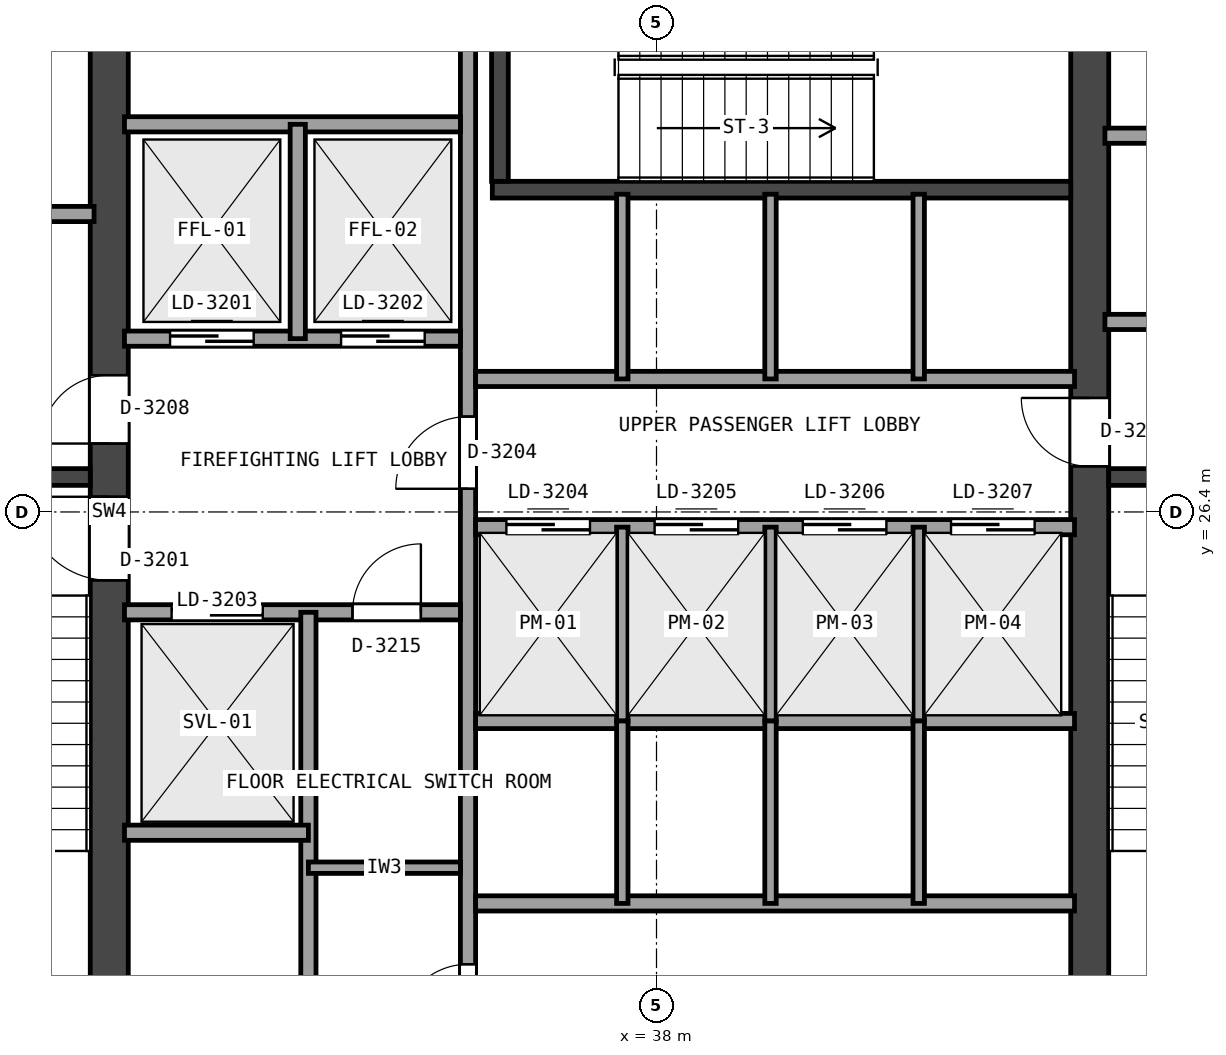
"""IFC4 building model, lengths in metres.
Left out: names, types, materials, properties, quantities, classifications, styles, units other than length and angle.
Written with IfcOpenShell. Run it as: python <this file> out.ifc"""

import sys

from ifc_helpers import new_model, si_unit, direction, frame, frame_2d, origin, place, context, subcontext, project, spatial, rectangle, extrude, element, fill, save


model = new_model("IFC4")
c1 = context("Model", 3, precision=1e-05, world=origin(), true_north=direction((0.0, 1.0)))
c2 = subcontext(c1, "Body", "Model", "MODEL_VIEW")
j1 = project(units=[si_unit("LENGTHUNIT", "METRE"), si_unit("PLANEANGLEUNIT", "RADIAN")], contexts=[c1])
p1 = place(None, origin())
s1 = spatial("IfcSite", under=j1, at=p1, CompositionType="ELEMENT")
p2 = place(p1, origin())
s2 = spatial("IfcBuilding", under=s1, at=p2, CompositionType="ELEMENT")
p3 = place(p2, frame((0.0, 0.0, 121.2)))
s3 = spatial("IfcBuildingStorey", under=s2, at=p3, CompositionType="ELEMENT", Elevation=121.2)
p4 = place(p3, frame((30.8, 18.9, 0.0), z_axis=(0.0, 0.0, 1.0), x_axis=(0.0, 1.0, 0.0)))
e1 = element("IfcWall", 1, at=p4, inside=s3, PredefinedType="SHEAR", context=c2, shape_type="SweptSolid", body=[
    extrude(rectangle(XDim=15.0, YDim=0.5, at=frame_2d((7.5, 0.0))), origin(), (0.0, 0.0, 1.0), 4.08),
])
p5 = place(p4, frame((6.6, 0.0, 0.0)))
e2 = element("IfcOpeningElement", 2, at=p5, cuts=e1, PredefinedType="OPENING", context=c2, shape_type="SweptSolid", body=[
    extrude(rectangle(XDim=1.1, YDim=2.15, at=frame_2d((0.55, 1.075))), frame((0.0, 0.26, 0.0), z_axis=(0.0, -1.0, 0.0), x_axis=(1.0, 0.0, 0.0)), (0.0, 0.0, 1.0), 0.52),
])
p6 = place(p4, frame((8.4, 0.0, 0.0)))
e3 = element("IfcOpeningElement", 3, at=p6, cuts=e1, PredefinedType="OPENING", context=c2, shape_type="SweptSolid", body=[
    extrude(rectangle(XDim=0.9, YDim=2.1, at=frame_2d((0.45, 1.05))), frame((0.0, 0.26, 0.0), z_axis=(0.0, -1.0, 0.0), x_axis=(1.0, 0.0, 0.0)), (0.0, 0.0, 1.0), 0.52),
])
p7 = place(p3, frame((43.7, 18.9, 0.0), z_axis=(0.0, 0.0, 1.0), x_axis=(0.0, 1.0, 0.0)))
e4 = element("IfcWall", 4, at=p7, inside=s3, PredefinedType="SHEAR", context=c2, shape_type="SweptSolid", body=[
    extrude(rectangle(XDim=15.0, YDim=0.5, at=frame_2d((7.5, 0.0))), origin(), (0.0, 0.0, 1.0), 4.08),
])
p8 = place(p7, frame((8.1, 0.0, 0.0)))
e5 = element("IfcOpeningElement", 5, at=p8, cuts=e4, PredefinedType="OPENING", context=c2, shape_type="SweptSolid", body=[
    extrude(rectangle(XDim=0.9, YDim=2.1, at=frame_2d((0.45, 1.05))), frame((0.0, 0.26, 0.0), z_axis=(0.0, -1.0, 0.0), x_axis=(1.0, 0.0, 0.0)), (0.0, 0.0, 1.0), 0.52),
])
p9 = place(p3, frame((27.1, 26.86, 0.0), z_axis=(0.0, 0.0, 1.0), x_axis=(1.0, 0.0, 0.0)))
e6 = element("IfcWall", 6, at=p9, inside=s3, PredefinedType="SHEAR", context=c2, shape_type="SweptSolid", body=[
    extrude(rectangle(XDim=3.45, YDim=0.22, at=frame_2d((1.725, 0.0))), origin(), (0.0, 0.0, 1.0), 4.08),
])
p10 = place(p3, frame((43.95, 26.86, 0.0), z_axis=(0.0, 0.0, 1.0), x_axis=(1.0, 0.0, 0.0)))
e7 = element("IfcWall", 7, at=p10, inside=s3, PredefinedType="SHEAR", context=c2, shape_type="SweptSolid", body=[
    extrude(rectangle(XDim=3.35, YDim=0.22, at=frame_2d((1.675, 0.0))), origin(), (0.0, 0.0, 1.0), 4.08),
])
p11 = place(p3, frame((35.84, 30.64, 0.0), z_axis=(0.0, 0.0, 1.0), x_axis=(1.0, 0.0, 0.0)))
e8 = element("IfcWall", 8, at=p11, inside=s3, PredefinedType="SHEAR", context=c2, shape_type="SweptSolid", body=[
    extrude(rectangle(XDim=7.61, YDim=0.22, at=frame_2d((3.805, 0.0))), origin(), (0.0, 0.0, 1.0), 4.08),
])
p12 = place(p3, frame((35.94, 30.75, 0.0), z_axis=(0.0, 0.0, 1.0), x_axis=(0.0, 1.0, 0.0)))
e9 = element("IfcWall", 9, at=p12, inside=s3, PredefinedType="SHEAR", context=c2, shape_type="SweptSolid", body=[
    extrude(rectangle(XDim=3.15, YDim=0.22, at=frame_2d((1.575, 0.0))), origin(), (0.0, 0.0, 1.0), 4.08),
])
p13 = place(p3, frame((27.15, 30.32, 0.0), z_axis=(0.0, 0.0, 1.0), x_axis=(1.0, 0.0, 0.0)))
e10 = element("IfcWall", 10, at=p13, inside=s3, PredefinedType="SOLIDWALL", context=c2, shape_type="SweptSolid", body=[
    extrude(rectangle(XDim=3.45, YDim=0.2, at=frame_2d((1.725, 0.0))), origin(), (0.0, 0.0, 1.0), 4.08),
])
p14 = place(p3, frame((43.9, 28.9, 0.0), z_axis=(0.0, 0.0, 1.0), x_axis=(1.0, 0.0, 0.0)))
e11 = element("IfcWall", 11, at=p14, inside=s3, PredefinedType="SOLIDWALL", context=c2, shape_type="SweptSolid", body=[
    extrude(rectangle(XDim=3.35, YDim=0.2, at=frame_2d((1.675, 0.0))), origin(), (0.0, 0.0, 1.0), 4.08),
])
p15 = place(p14, frame((1.15, 0.0, 0.0)))
e12 = element("IfcOpeningElement", 12, at=p15, cuts=e11, PredefinedType="OPENING", context=c2, shape_type="SweptSolid", body=[
    extrude(rectangle(XDim=0.9, YDim=2.1, at=frame_2d((0.45, 1.05))), frame((0.0, 0.11, 0.0), z_axis=(0.0, -1.0, 0.0), x_axis=(1.0, 0.0, 0.0)), (0.0, 0.0, 1.0), 0.22),
])
p16 = place(p3, frame((43.9, 31.35, 0.0), z_axis=(0.0, 0.0, 1.0), x_axis=(1.0, 0.0, 0.0)))
e13 = element("IfcWall", 13, at=p16, inside=s3, PredefinedType="SOLIDWALL", context=c2, shape_type="SweptSolid", body=[
    extrude(rectangle(XDim=3.35, YDim=0.2, at=frame_2d((1.675, 0.0))), origin(), (0.0, 0.0, 1.0), 4.08),
])
p17 = place(p3, frame((35.52, 18.95, 0.0), z_axis=(0.0, 0.0, 1.0), x_axis=(0.0, 1.0, 0.0)))
e14 = element("IfcWall", 14, at=p17, inside=s3, PredefinedType="SOLIDWALL", context=c2, shape_type="SweptSolid", body=[
    extrude(rectangle(XDim=14.9, YDim=0.2, at=frame_2d((7.45, 0.0))), origin(), (0.0, 0.0, 1.0), 3.601),
])
p18 = place(p17, frame((7.755, 0.0, 0.0)))
e15 = element("IfcOpeningElement", 15, at=p18, cuts=e14, PredefinedType="OPENING", context=c2, shape_type="SweptSolid", body=[
    extrude(rectangle(XDim=0.95, YDim=2.15, at=frame_2d((0.475, 1.075))), frame((0.0, 0.11, 0.0), z_axis=(0.0, -1.0, 0.0), x_axis=(1.0, 0.0, 0.0)), (0.0, 0.0, 1.0), 0.22),
])
p19 = place(p17, frame((0.6, 0.0, 0.0)))
e16 = element("IfcOpeningElement", 16, at=p19, cuts=e14, PredefinedType="OPENING", context=c2, shape_type="SweptSolid", body=[
    extrude(rectangle(XDim=0.9, YDim=2.1, at=frame_2d((0.45, 1.05))), frame((0.0, 0.11, 0.0), z_axis=(0.0, -1.0, 0.0), x_axis=(1.0, 0.0, 0.0)), (0.0, 0.0, 1.0), 0.22),
])
p20 = place(p3, frame((31.0, 28.68, 0.0), z_axis=(0.0, 0.0, 1.0), x_axis=(1.0, 0.0, 0.0)))
e17 = element("IfcWall", 17, at=p20, inside=s3, PredefinedType="SOLIDWALL", context=c2, shape_type="SweptSolid", body=[
    extrude(rectangle(XDim=4.42, YDim=0.2, at=frame_2d((2.21, 0.0))), origin(), (0.0, 0.0, 1.0), 4.08),
])
p21 = place(p20, frame((0.6, 0.0, 0.0)))
e18 = element("IfcOpeningElement", 18, at=p21, cuts=e17, PredefinedType="OPENING", context=c2, shape_type="SweptSolid", body=[
    extrude(rectangle(XDim=1.1, YDim=2.15, at=frame_2d((0.55, 1.075))), frame((0.0, 0.11, 0.0), z_axis=(0.0, -1.0, 0.0), x_axis=(1.0, 0.0, 0.0)), (0.0, 0.0, 1.0), 0.22),
])
p22 = place(p20, frame((2.85, 0.0, 0.0)))
e19 = element("IfcOpeningElement", 19, at=p22, cuts=e17, PredefinedType="OPENING", context=c2, shape_type="SweptSolid", body=[
    extrude(rectangle(XDim=1.1, YDim=2.15, at=frame_2d((0.55, 1.075))), frame((0.0, 0.11, 0.0), z_axis=(0.0, -1.0, 0.0), x_axis=(1.0, 0.0, 0.0)), (0.0, 0.0, 1.0), 0.22),
])
p23 = place(p3, frame((31.0, 31.5, 0.0), z_axis=(0.0, 0.0, 1.0), x_axis=(1.0, 0.0, 0.0)))
e20 = element("IfcWall", 20, at=p23, inside=s3, PredefinedType="SOLIDWALL", context=c2, shape_type="SweptSolid", body=[
    extrude(rectangle(XDim=4.42, YDim=0.2, at=frame_2d((2.21, 0.0))), origin(), (0.0, 0.0, 1.0), 4.08),
])
p24 = place(p3, frame((33.28, 28.68, 0.0), z_axis=(0.0, 0.0, 1.0), x_axis=(0.0, 1.0, 0.0)))
e21 = element("IfcWall", 21, at=p24, inside=s3, PredefinedType="SOLIDWALL", context=c2, shape_type="SweptSolid", body=[
    extrude(rectangle(XDim=2.82, YDim=0.2, at=frame_2d((1.41, 0.0))), origin(), (0.0, 0.0, 1.0), 4.08),
])
p25 = place(p3, frame((31.0, 25.08, 0.0), z_axis=(0.0, 0.0, 1.0), x_axis=(1.0, 0.0, 0.0)))
e22 = element("IfcWall", 22, at=p25, inside=s3, PredefinedType="SOLIDWALL", context=c2, shape_type="SweptSolid", body=[
    extrude(rectangle(XDim=4.42, YDim=0.2, at=frame_2d((2.21, 0.0))), origin(), (0.0, 0.0, 1.0), 4.08),
])
p26 = place(p25, frame((3.0, 0.0, 0.0)))
e23 = element("IfcOpeningElement", 23, at=p26, cuts=e22, PredefinedType="OPENING", context=c2, shape_type="SweptSolid", body=[
    extrude(rectangle(XDim=0.9, YDim=2.1, at=frame_2d((0.45, 1.05))), frame((0.0, 0.11, 0.0), z_axis=(0.0, -1.0, 0.0), x_axis=(1.0, 0.0, 0.0)), (0.0, 0.0, 1.0), 0.22),
])
p27 = place(p25, frame((0.62, 0.0, 0.0)))
e24 = element("IfcOpeningElement", 24, at=p27, cuts=e22, PredefinedType="OPENING", context=c2, shape_type="SweptSolid", body=[
    extrude(rectangle(XDim=1.2, YDim=2.15, at=frame_2d((0.6, 1.075))), frame((0.0, 0.11, 0.0), z_axis=(0.0, -1.0, 0.0), x_axis=(1.0, 0.0, 0.0)), (0.0, 0.0, 1.0), 0.22),
])
p28 = place(p3, frame((33.42, 18.95, 0.0), z_axis=(0.0, 0.0, 1.0), x_axis=(0.0, 1.0, 0.0)))
e25 = element("IfcWall", 25, at=p28, inside=s3, PredefinedType="SOLIDWALL", context=c2, shape_type="SweptSolid", body=[
    extrude(rectangle(XDim=6.13, YDim=0.2, at=frame_2d((3.065, 0.0))), origin(), (0.0, 0.0, 1.0), 3.601),
])
p29 = place(p3, frame((31.0, 22.18, 0.0), z_axis=(0.0, 0.0, 1.0), x_axis=(1.0, 0.0, 0.0)))
e26 = element("IfcWall", 26, at=p29, inside=s3, PredefinedType="SOLIDWALL", context=c2, shape_type="SweptSolid", body=[
    extrude(rectangle(XDim=2.42, YDim=0.2, at=frame_2d((1.21, 0.0))), origin(), (0.0, 0.0, 1.0), 4.08),
])
p30 = place(p3, frame((33.42, 21.72, 0.0), z_axis=(0.0, 0.0, 1.0), x_axis=(1.0, 0.0, 0.0)))
e27 = element("IfcWall", 27, at=p30, inside=s3, PredefinedType="PARTITIONING", context=c2, shape_type="SweptSolid", body=[
    extrude(rectangle(XDim=2.0, YDim=0.15, at=frame_2d((1.0, 0.0))), origin(), (0.0, 0.0, 1.0), 4.08),
])
p31 = place(p3, frame((35.62, 28.15, 0.0), z_axis=(0.0, 0.0, 1.0), x_axis=(1.0, 0.0, 0.0)))
e28 = element("IfcWall", 28, at=p31, inside=s3, PredefinedType="SOLIDWALL", context=c2, shape_type="SweptSolid", body=[
    extrude(rectangle(XDim=7.88, YDim=0.2, at=frame_2d((3.94, 0.0))), origin(), (0.0, 0.0, 1.0), 4.08),
])
p32 = place(p3, frame((35.62, 26.2, 0.0), z_axis=(0.0, 0.0, 1.0), x_axis=(1.0, 0.0, 0.0)))
e29 = element("IfcWall", 29, at=p32, inside=s3, PredefinedType="SOLIDWALL", context=c2, shape_type="SweptSolid", body=[
    extrude(rectangle(XDim=7.88, YDim=0.2, at=frame_2d((3.94, 0.0))), origin(), (0.0, 0.0, 1.0), 4.08),
])
p33 = place(p32, frame((0.405, 0.0, 0.0)))
e30 = element("IfcOpeningElement", 30, at=p33, cuts=e29, PredefinedType="OPENING", context=c2, shape_type="SweptSolid", body=[
    extrude(rectangle(XDim=1.1, YDim=2.15, at=frame_2d((0.55, 1.075))), frame((0.0, 0.11, 0.0), z_axis=(0.0, -1.0, 0.0), x_axis=(1.0, 0.0, 0.0)), (0.0, 0.0, 1.0), 0.22),
])
p34 = place(p32, frame((2.355, 0.0, 0.0)))
e31 = element("IfcOpeningElement", 31, at=p34, cuts=e29, PredefinedType="OPENING", context=c2, shape_type="SweptSolid", body=[
    extrude(rectangle(XDim=1.1, YDim=2.15, at=frame_2d((0.55, 1.075))), frame((0.0, 0.11, 0.0), z_axis=(0.0, -1.0, 0.0), x_axis=(1.0, 0.0, 0.0)), (0.0, 0.0, 1.0), 0.22),
])
p35 = place(p32, frame((4.305, 0.0, 0.0)))
e32 = element("IfcOpeningElement", 32, at=p35, cuts=e29, PredefinedType="OPENING", context=c2, shape_type="SweptSolid", body=[
    extrude(rectangle(XDim=1.1, YDim=2.15, at=frame_2d((0.55, 1.075))), frame((0.0, 0.11, 0.0), z_axis=(0.0, -1.0, 0.0), x_axis=(1.0, 0.0, 0.0)), (0.0, 0.0, 1.0), 0.22),
])
p36 = place(p32, frame((6.255, 0.0, 0.0)))
e33 = element("IfcOpeningElement", 33, at=p36, cuts=e29, PredefinedType="OPENING", context=c2, shape_type="SweptSolid", body=[
    extrude(rectangle(XDim=1.1, YDim=2.15, at=frame_2d((0.55, 1.075))), frame((0.0, 0.11, 0.0), z_axis=(0.0, -1.0, 0.0), x_axis=(1.0, 0.0, 0.0)), (0.0, 0.0, 1.0), 0.22),
])
p37 = place(p3, frame((35.62, 23.65, 0.0), z_axis=(0.0, 0.0, 1.0), x_axis=(1.0, 0.0, 0.0)))
e34 = element("IfcWall", 34, at=p37, inside=s3, PredefinedType="SOLIDWALL", context=c2, shape_type="SweptSolid", body=[
    extrude(rectangle(XDim=7.88, YDim=0.2, at=frame_2d((3.94, 0.0))), origin(), (0.0, 0.0, 1.0), 3.601),
])
p38 = place(p3, frame((35.62, 21.25, 0.0), z_axis=(0.0, 0.0, 1.0), x_axis=(1.0, 0.0, 0.0)))
e35 = element("IfcWall", 35, at=p38, inside=s3, PredefinedType="SOLIDWALL", context=c2, shape_type="SweptSolid", body=[
    extrude(rectangle(XDim=7.88, YDim=0.2, at=frame_2d((3.94, 0.0))), origin(), (0.0, 0.0, 1.0), 4.08),
])
for number, where, z_axis, x_axis in (
    (36, (37.55, 28.15, 0.0), (0.0, 0.0, 1.0), (0.0, 1.0, 0.0)),
    (37, (39.5, 28.15, 0.0), (0.0, 0.0, 1.0), (0.0, 1.0, 0.0)),
    (38, (41.45, 28.15, 0.0), (0.0, 0.0, 1.0), (0.0, 1.0, 0.0)),
):
    element("IfcWall", number, at=place(p3, frame(where, z_axis=z_axis, x_axis=x_axis)), inside=s3, PredefinedType="PARTITIONING", context=c2, shape_type="SweptSolid", body=[
        extrude(rectangle(XDim=2.43, YDim=0.15, at=frame_2d((1.215, 0.0))), origin(), (0.0, 0.0, 1.0), 4.08),
    ])
for number, where, z_axis, x_axis in (
    (39, (37.55, 23.65, 0.0), (0.0, 0.0, 1.0), (0.0, 1.0, 0.0)),
    (40, (39.5, 23.65, 0.0), (0.0, 0.0, 1.0), (0.0, 1.0, 0.0)),
    (41, (41.45, 23.65, 0.0), (0.0, 0.0, 1.0), (0.0, 1.0, 0.0)),
):
    element("IfcWall", number, at=place(p3, frame(where, z_axis=z_axis, x_axis=x_axis)), inside=s3, PredefinedType="PARTITIONING", context=c2, shape_type="SweptSolid", body=[
        extrude(rectangle(XDim=2.55, YDim=0.15, at=frame_2d((1.275, 0.0))), origin(), (0.0, 0.0, 1.0), 3.601),
    ])
for number, where, z_axis, x_axis in (
    (42, (37.55, 21.25, 0.0), (0.0, 0.0, 1.0), (0.0, 1.0, 0.0)),
    (43, (39.5, 21.25, 0.0), (0.0, 0.0, 1.0), (0.0, 1.0, 0.0)),
    (44, (41.45, 21.25, 0.0), (0.0, 0.0, 1.0), (0.0, 1.0, 0.0)),
):
    element("IfcWall", number, at=place(p3, frame(where, z_axis=z_axis, x_axis=x_axis)), inside=s3, PredefinedType="PARTITIONING", context=c2, shape_type="SweptSolid", body=[
        extrude(rectangle(XDim=2.4, YDim=0.15, at=frame_2d((1.2, 0.0))), origin(), (0.0, 0.0, 1.0), 3.601),
    ])
p39 = place(p5, origin())
e45 = element("IfcDoor", 45, at=p39, inside=s3, OperationType="SINGLE_SWING_RIGHT", PredefinedType="DOOR", context=c2, shape_type="SweptSolid", body=[
    extrude(rectangle(XDim=1.1, YDim=2.15, at=frame_2d((0.55, 1.075))), frame((0.0, 0.025, 0.0), z_axis=(0.0, -1.0, 0.0), x_axis=(1.0, 0.0, 0.0)), (0.0, 0.0, 1.0), 0.05),
])
fill(e2, e45)
p40 = place(p18, origin())
e46 = element("IfcDoor", 46, at=p40, inside=s3, OperationType="SINGLE_SWING_LEFT", PredefinedType="DOOR", context=c2, shape_type="SweptSolid", body=[
    extrude(rectangle(XDim=0.95, YDim=2.15, at=frame_2d((0.475, 1.075))), frame((0.0, 0.025, 0.0), z_axis=(0.0, -1.0, 0.0), x_axis=(1.0, 0.0, 0.0)), (0.0, 0.0, 1.0), 0.05),
])
fill(e15, e46)
p41 = place(p8, origin())
e47 = element("IfcDoor", 47, at=p41, inside=s3, OperationType="SINGLE_SWING_RIGHT", PredefinedType="DOOR", context=c2, shape_type="SweptSolid", body=[
    extrude(rectangle(XDim=0.9, YDim=2.1, at=frame_2d((0.45, 1.05))), frame((0.0, 0.025, 0.0), z_axis=(0.0, -1.0, 0.0), x_axis=(1.0, 0.0, 0.0)), (0.0, 0.0, 1.0), 0.05),
])
fill(e5, e47)
p42 = place(p6, origin())
e48 = element("IfcDoor", 48, at=p42, inside=s3, OperationType="SINGLE_SWING_LEFT", PredefinedType="DOOR", context=c2, shape_type="SweptSolid", body=[
    extrude(rectangle(XDim=0.9, YDim=2.1, at=frame_2d((0.45, 1.05))), frame((0.0, 0.025, 0.0), z_axis=(0.0, -1.0, 0.0), x_axis=(1.0, 0.0, 0.0)), (0.0, 0.0, 1.0), 0.05),
])
fill(e3, e48)
p43 = place(p19, origin())
e49 = element("IfcDoor", 49, at=p43, inside=s3, OperationType="SINGLE_SWING_LEFT", PredefinedType="DOOR", context=c2, shape_type="SweptSolid", body=[
    extrude(rectangle(XDim=0.9, YDim=2.1, at=frame_2d((0.45, 1.05))), frame((0.0, 0.025, 0.0), z_axis=(0.0, -1.0, 0.0), x_axis=(1.0, 0.0, 0.0)), (0.0, 0.0, 1.0), 0.05),
])
fill(e16, e49)
p44 = place(p26, origin())
e50 = element("IfcDoor", 50, at=p44, inside=s3, OperationType="SINGLE_SWING_RIGHT", PredefinedType="DOOR", context=c2, shape_type="SweptSolid", body=[
    extrude(rectangle(XDim=0.9, YDim=2.1, at=frame_2d((0.45, 1.05))), frame((0.0, 0.025, 0.0), z_axis=(0.0, -1.0, 0.0), x_axis=(1.0, 0.0, 0.0)), (0.0, 0.0, 1.0), 0.05),
])
fill(e23, e50)
p45 = place(p21, origin())
e51 = element("IfcDoor", 51, at=p45, inside=s3, OperationType="SLIDING_TO_LEFT", PredefinedType="DOOR", context=c2, shape_type="SweptSolid", body=[
    extrude(rectangle(XDim=1.1, YDim=2.15, at=frame_2d((0.55, 1.075))), frame((0.0, 0.025, 0.0), z_axis=(0.0, -1.0, 0.0), x_axis=(1.0, 0.0, 0.0)), (0.0, 0.0, 1.0), 0.05),
])
fill(e18, e51)
p46 = place(p22, origin())
e52 = element("IfcDoor", 52, at=p46, inside=s3, OperationType="SLIDING_TO_LEFT", PredefinedType="DOOR", context=c2, shape_type="SweptSolid", body=[
    extrude(rectangle(XDim=1.1, YDim=2.15, at=frame_2d((0.55, 1.075))), frame((0.0, 0.025, 0.0), z_axis=(0.0, -1.0, 0.0), x_axis=(1.0, 0.0, 0.0)), (0.0, 0.0, 1.0), 0.05),
])
fill(e19, e52)
p47 = place(p27, origin())
e53 = element("IfcDoor", 53, at=p47, inside=s3, OperationType="SLIDING_TO_LEFT", PredefinedType="DOOR", context=c2, shape_type="SweptSolid", body=[
    extrude(rectangle(XDim=1.2, YDim=2.15, at=frame_2d((0.6, 1.075))), frame((0.0, 0.025, 0.0), z_axis=(0.0, -1.0, 0.0), x_axis=(1.0, 0.0, 0.0)), (0.0, 0.0, 1.0), 0.05),
])
fill(e24, e53)
p48 = place(p33, origin())
e54 = element("IfcDoor", 54, at=p48, inside=s3, OperationType="SLIDING_TO_LEFT", PredefinedType="DOOR", context=c2, shape_type="SweptSolid", body=[
    extrude(rectangle(XDim=1.1, YDim=2.15, at=frame_2d((0.55, 1.075))), frame((0.0, 0.025, 0.0), z_axis=(0.0, -1.0, 0.0), x_axis=(1.0, 0.0, 0.0)), (0.0, 0.0, 1.0), 0.05),
])
fill(e30, e54)
p49 = place(p34, origin())
e55 = element("IfcDoor", 55, at=p49, inside=s3, OperationType="SLIDING_TO_LEFT", PredefinedType="DOOR", context=c2, shape_type="SweptSolid", body=[
    extrude(rectangle(XDim=1.1, YDim=2.15, at=frame_2d((0.55, 1.075))), frame((0.0, 0.025, 0.0), z_axis=(0.0, -1.0, 0.0), x_axis=(1.0, 0.0, 0.0)), (0.0, 0.0, 1.0), 0.05),
])
fill(e31, e55)
p50 = place(p35, origin())
e56 = element("IfcDoor", 56, at=p50, inside=s3, OperationType="SLIDING_TO_LEFT", PredefinedType="DOOR", context=c2, shape_type="SweptSolid", body=[
    extrude(rectangle(XDim=1.1, YDim=2.15, at=frame_2d((0.55, 1.075))), frame((0.0, 0.025, 0.0), z_axis=(0.0, -1.0, 0.0), x_axis=(1.0, 0.0, 0.0)), (0.0, 0.0, 1.0), 0.05),
])
fill(e32, e56)
p51 = place(p36, origin())
e57 = element("IfcDoor", 57, at=p51, inside=s3, OperationType="SLIDING_TO_LEFT", PredefinedType="DOOR", context=c2, shape_type="SweptSolid", body=[
    extrude(rectangle(XDim=1.1, YDim=2.15, at=frame_2d((0.55, 1.075))), frame((0.0, 0.025, 0.0), z_axis=(0.0, -1.0, 0.0), x_axis=(1.0, 0.0, 0.0)), (0.0, 0.0, 1.0), 0.05),
])
fill(e33, e57)
save(model, sys.argv[1])
